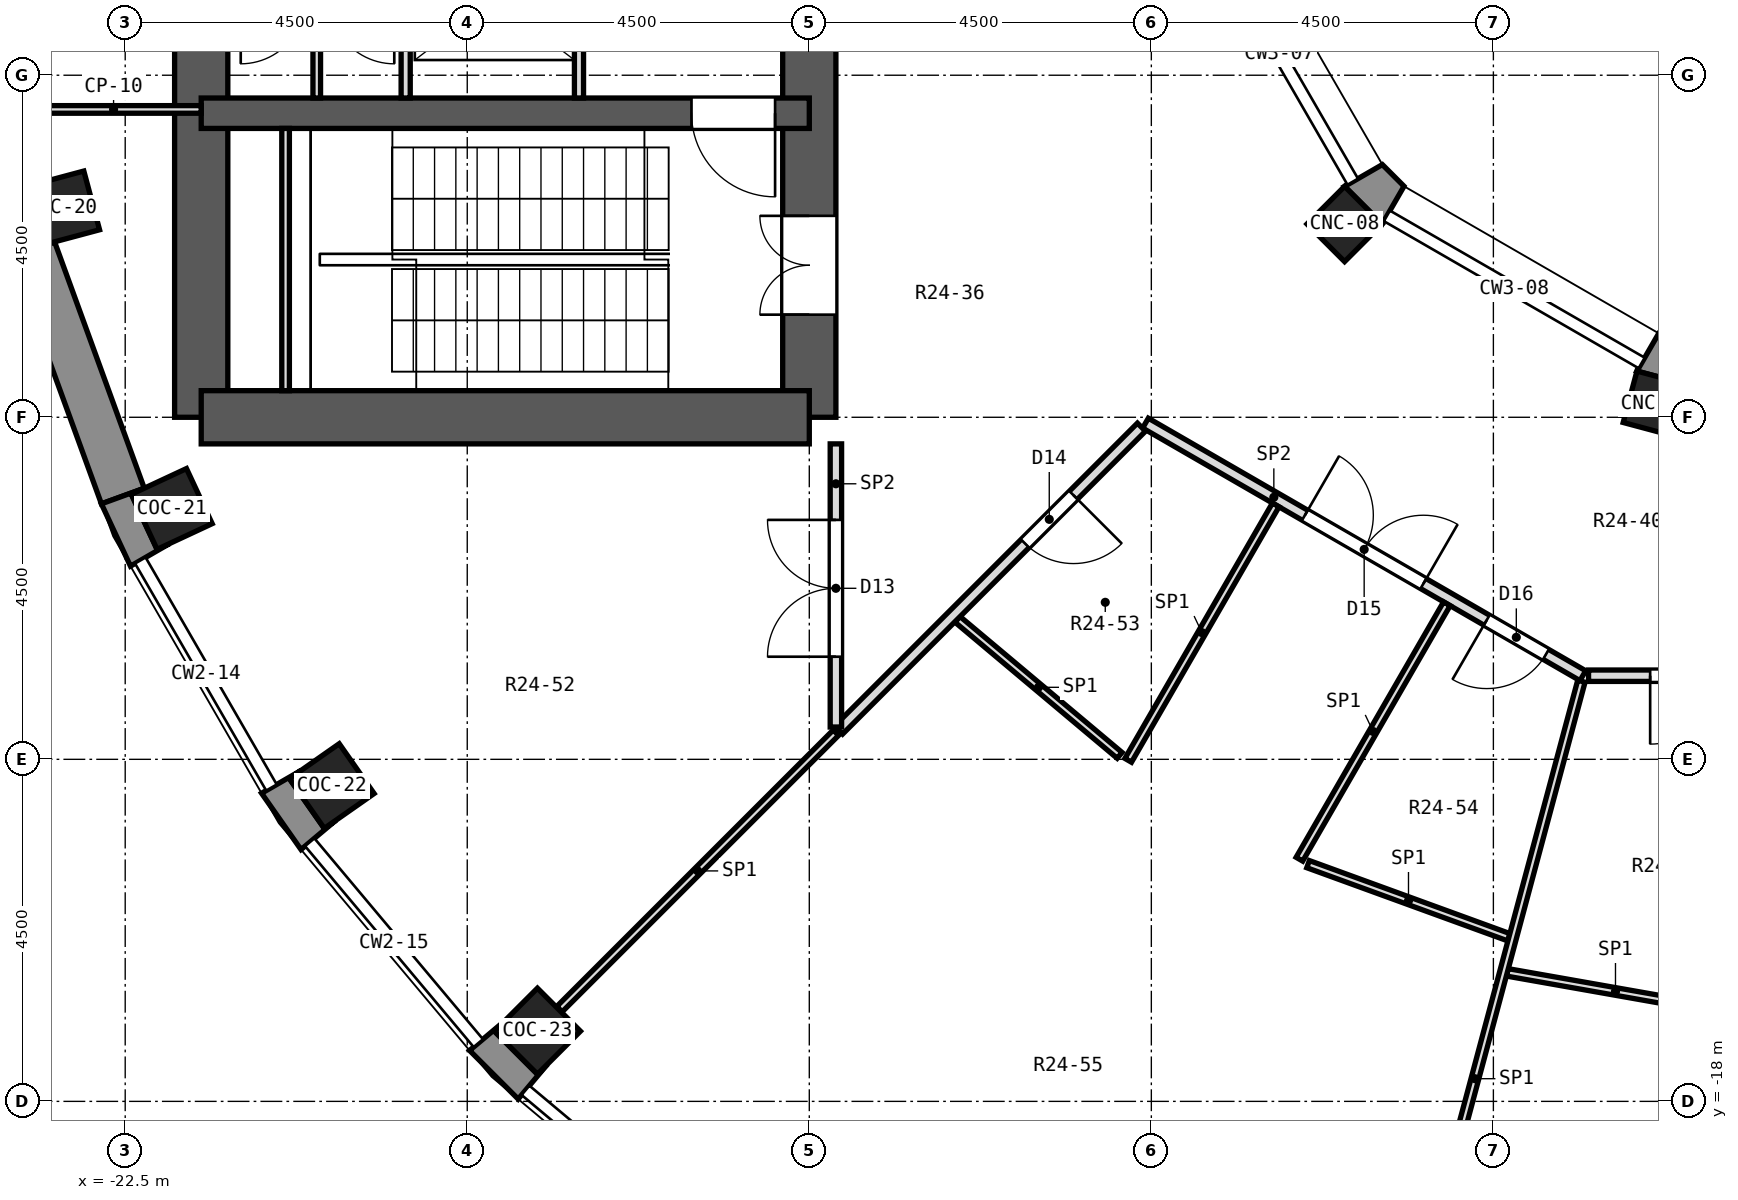
"""IFC4 building model, lengths in metres.
Left out: names, types, materials, properties, quantities, classifications, styles, units other than length and angle.
Written with IfcOpenShell. Run it as: python <this file> out.ifc"""

import sys

from ifc_helpers import new_model, si_unit, direction, frame, frame_2d, origin, origin_2d, place, context, subcontext, project, spatial, polyline, rectangle, outline, extrude, element, fill, save


model = new_model("IFC4")
c1 = context("Model", 3, precision=1e-05, world=origin(), true_north=direction((0.0, 1.0)))
c2 = subcontext(c1, "Body", "Model", "MODEL_VIEW")
j1 = project(units=[si_unit("LENGTHUNIT", "METRE"), si_unit("PLANEANGLEUNIT", "RADIAN")], contexts=[c1])
p1 = place(None, origin())
s1 = spatial("IfcSite", under=j1, at=p1, CompositionType="ELEMENT")
p2 = place(p1, origin())
s2 = spatial("IfcBuilding", under=s1, at=p2, CompositionType="ELEMENT")
p3 = place(p2, frame((0.0, 0.0, 155.8)))
s3 = spatial("IfcBuildingStorey", under=s2, at=p3, CompositionType="ELEMENT", Elevation=155.8)
for number, where, z_axis, x_axis in (
    (1, (-23.327, -6.25, -0.55), (0.0, 0.0, 1.0), (-0.966, -0.259, 0.0)),
    (2, (-21.887, -10.206, -0.55), (0.0, 0.0, 1.0), (-0.906, -0.423, 0.0)),
    (3, (-19.782, -13.852, -0.55), (0.0, 0.0, 1.0), (-0.819, -0.574, 0.0)),
    (4, (-17.077, -17.077, -0.55), (0.0, 0.0, 1.0), (-0.707, -0.707, 0.0)),
):
    element("IfcColumn", number, at=place(p3, frame(where, z_axis=z_axis, x_axis=x_axis)), inside=s3, PredefinedType="COLUMN", context=c2, shape_type="SweptSolid", body=[
        extrude(rectangle(XDim=0.8, YDim=0.8, at=origin_2d()), origin(), (0.0, 0.0, 1.0), 5.55),
    ])
for number, where, z_axis, x_axis in (
    (5, (-6.458, -6.458, 0.0), (0.0, 0.0, 1.0), (-0.707, -0.707, 0.0)),
    (6, (-2.364, -8.821, 0.0), (0.0, 0.0, 1.0), (-0.259, -0.966, 0.0)),
):
    element("IfcColumn", number, at=place(p3, frame(where, z_axis=z_axis, x_axis=x_axis)), inside=s3, PredefinedType="COLUMN", context=c2, shape_type="SweptSolid", body=[
        extrude(rectangle(XDim=0.7, YDim=0.7, at=origin_2d()), origin(), (0.0, 0.0, 1.0), 5.0),
    ])
p4 = place(p3, frame((-13.5, -9.0, 0.0), z_axis=(0.0, 0.0, 1.0), x_axis=(0.0, 1.0, 0.0)))
e7 = element("IfcWall", 7, at=p4, inside=s3, PredefinedType="SHEAR", context=c2, shape_type="SweptSolid", body=[
    extrude(rectangle(XDim=18.0, YDim=0.7, at=frame_2d((9.0, 0.0))), origin(), (0.0, 0.0, 1.0), 5.0),
])
p5 = place(p4, frame((15.35, 0.0, 0.0)))
e8 = element("IfcOpeningElement", 8, at=p5, cuts=e7, PredefinedType="OPENING", context=c2, shape_type="SweptSolid", body=[
    extrude(rectangle(XDim=1.3, YDim=2.1, at=frame_2d((0.65, 1.05))), frame((0.0, 0.362, 0.0), z_axis=(0.0, -1.0, 0.0), x_axis=(1.0, 0.0, 0.0)), (0.0, 0.0, 1.0), 0.724),
])
p6 = place(p4, frame((1.35, 0.0, 0.0)))
e9 = element("IfcOpeningElement", 9, at=p6, cuts=e7, PredefinedType="OPENING", context=c2, shape_type="SweptSolid", body=[
    extrude(rectangle(XDim=1.3, YDim=2.1, at=frame_2d((0.65, 1.05))), frame((0.0, 0.362, 0.0), z_axis=(0.0, -1.0, 0.0), x_axis=(1.0, 0.0, 0.0)), (0.0, 0.0, 1.0), 0.724),
])
p7 = place(p4, frame((7.5, 0.0, 0.0)))
e10 = element("IfcOpeningElement", 10, at=p7, cuts=e7, PredefinedType="OPENING", context=c2, shape_type="SweptSolid", body=[
    extrude(rectangle(XDim=3.0, YDim=2.4, at=frame_2d((1.5, 1.2))), frame((0.0, 0.362, 0.0), z_axis=(0.0, -1.0, 0.0), x_axis=(1.0, 0.0, 0.0)), (0.0, 0.0, 1.0), 0.724),
])
p8 = place(p3, frame((-21.5, -9.0, 0.0), z_axis=(0.0, 0.0, 1.0), x_axis=(0.0, 1.0, 0.0)))
e11 = element("IfcWall", 11, at=p8, inside=s3, PredefinedType="SHEAR", context=c2, shape_type="SweptSolid", body=[
    extrude(rectangle(XDim=18.0, YDim=0.7, at=frame_2d((9.0, 0.0))), origin(), (0.0, 0.0, 1.0), 5.0),
])
p9 = place(p8, frame((9.45, 0.0, 0.0)))
e12 = element("IfcOpeningElement", 12, at=p9, cuts=e11, PredefinedType="OPENING", context=c2, shape_type="SweptSolid", body=[
    extrude(rectangle(XDim=0.9, YDim=2.1, at=frame_2d((0.45, 1.05))), frame((0.0, 0.362, 0.0), z_axis=(0.0, -1.0, 0.0), x_axis=(1.0, 0.0, 0.0)), (0.0, 0.0, 1.0), 0.724),
])
p10 = place(p8, frame((7.65, 0.0, 0.0)))
e13 = element("IfcOpeningElement", 13, at=p10, cuts=e11, PredefinedType="OPENING", context=c2, shape_type="SweptSolid", body=[
    extrude(rectangle(XDim=0.9, YDim=2.1, at=frame_2d((0.45, 1.05))), frame((0.0, 0.362, 0.0), z_axis=(0.0, -1.0, 0.0), x_axis=(1.0, 0.0, 0.0)), (0.0, 0.0, 1.0), 0.724),
])
p11 = place(p3, frame((-13.5, -9.0, 0.0), z_axis=(0.0, 0.0, 1.0), x_axis=(-1.0, 0.0, 0.0)))
e14 = element("IfcWall", 14, at=p11, inside=s3, PredefinedType="SHEAR", context=c2, shape_type="SweptSolid", body=[
    extrude(rectangle(XDim=8.0, YDim=0.7, at=frame_2d((4.0, 0.0))), origin(), (0.0, 0.0, 1.0), 5.0),
])
p12 = place(p3, frame((-13.5, -5.0, 0.0), z_axis=(0.0, 0.0, 1.0), x_axis=(-1.0, 0.0, 0.0)))
e15 = element("IfcWall", 15, at=p12, inside=s3, PredefinedType="SHEAR", context=c2, shape_type="SweptSolid", body=[
    extrude(rectangle(XDim=8.0, YDim=0.4, at=frame_2d((4.0, 0.0))), origin(), (0.0, 0.0, 1.0), 5.0),
])
p13 = place(p12, frame((0.45, 0.0, 0.0)))
e16 = element("IfcOpeningElement", 16, at=p13, cuts=e15, PredefinedType="OPENING", context=c2, shape_type="SweptSolid", body=[
    extrude(rectangle(XDim=1.1, YDim=2.1, at=frame_2d((0.55, 1.05))), frame((0.0, 0.212, 0.0), z_axis=(0.0, -1.0, 0.0), x_axis=(1.0, 0.0, 0.0)), (0.0, 0.0, 1.0), 0.424),
])
p14 = place(p3, frame((-23.711, -6.794, 0.0), z_axis=(0.0, 0.0, 1.0), x_axis=(0.342032843455, -0.93968799822, 0.0)))
e17 = element("IfcWall", 17, at=p14, inside=s3, PredefinedType="SOLIDWALL", context=c2, shape_type="SweptSolid", body=[
    extrude(rectangle(XDim=3.45, YDim=0.6, at=frame_2d((1.725, 0.0))), origin(), (0.0, 0.0, 1.0), 4.55),
])
p15 = place(p3, origin())
e18 = element("IfcWall", 18, at=p15, inside=s3, PredefinedType="SOLIDWALL", context=c2, shape_type="SweptSolid", body=[
    extrude(outline(polyline([(-24.227, -6.023), (-23.993, -6.897), (-23.429, -6.692), (-23.61, -6.74), (-23.817, -5.968), (-23.636, -5.919), (-24.227, -6.023)])), origin(), (0.0, 0.0, 1.0), 4.55),
])
p16 = place(p3, origin())
e19 = element("IfcWall", 19, at=p16, inside=s3, PredefinedType="SOLIDWALL", context=c2, shape_type="SweptSolid", body=[
    extrude(outline(polyline([(-22.431, -10.959), (-21.911, -10.659), (-22.081, -10.738), (-22.419, -10.013), (-22.249, -9.934), (-22.813, -10.139), (-22.431, -10.959)])), origin(), (0.0, 0.0, 1.0), 4.55),
])
p17 = place(p3, origin())
e20 = element("IfcWall", 20, at=p17, inside=s3, PredefinedType="SOLIDWALL", context=c2, shape_type="SweptSolid", body=[
    extrude(outline(polyline([(-20.706, -13.946), (-20.187, -14.687), (-19.727, -14.302), (-19.881, -14.409), (-20.34, -13.754), (-20.186, -13.646), (-20.706, -13.946)])), origin(), (0.0, 0.0, 1.0), 4.55),
])
p18 = place(p3, origin())
e21 = element("IfcWall", 21, at=p18, inside=s3, PredefinedType="SOLIDWALL", context=c2, shape_type="SweptSolid", body=[
    extrude(outline(polyline([(-17.33, -17.969), (-16.944, -17.51), (-17.077, -17.642), (-17.642, -17.077), (-17.51, -16.944), (-17.969, -17.33), (-17.33, -17.969)])), origin(), (0.0, 0.0, 1.0), 4.55),
])
p19 = place(p3, origin())
e22 = element("IfcWall", 22, at=p19, inside=s3, PredefinedType="SOLIDWALL", context=c2, shape_type="SweptSolid", body=[
    extrude(outline(polyline([(-6.458, -5.962), (-5.962, -6.458), (-5.676, -5.961), (-5.961, -5.676), (-6.458, -5.962)])), origin(), (0.0, 0.0, 1.0), 4.55),
])
p20 = place(p3, origin())
e23 = element("IfcWall", 23, at=p20, inside=s3, PredefinedType="SOLIDWALL", context=c2, shape_type="SweptSolid", body=[
    extrude(outline(polyline([(-1.935, -8.573), (-1.935, -8.0), (-2.324, -7.896), (-2.611, -8.392), (-1.935, -8.573)])), origin(), (0.0, 0.0, 1.0), 4.55),
])
p21 = place(p3, frame((-11.552, -11.657, 0.0), z_axis=(0.0, 0.0, 1.0), x_axis=(0.766098290504, -0.642723431413, 0.0)))
e24 = element("IfcWall", 24, at=p21, inside=s3, PredefinedType="PARTITIONING", context=c2, shape_type="SweptSolid", body=[
    extrude(rectangle(XDim=2.786, YDim=0.1, at=frame_2d((1.393, 0.0))), origin(), (0.0, 0.0, 1.0), 4.55),
])
p22 = place(p3, frame((-9.077, -9.077, 0.0), z_axis=(0.0, 0.0, 1.0), x_axis=(0.865961614908, -0.500110469302, 0.0)))
e25 = element("IfcWall", 25, at=p22, inside=s3, PredefinedType="PARTITIONING", context=c2, shape_type="SweptSolid", body=[
    extrude(rectangle(XDim=6.645, YDim=0.15, at=frame_2d((3.322, 0.0))), origin(), (0.0, 0.0, 1.0), 4.55),
])
p23 = place(p22, frame((2.422, 0.0, 0.0)))
e26 = element("IfcOpeningElement", 26, at=p23, cuts=e25, PredefinedType="OPENING", context=c2, shape_type="SweptSolid", body=[
    extrude(rectangle(XDim=1.8, YDim=2.1, at=frame_2d((0.9, 1.05))), frame((0.0, 0.087, 0.0), z_axis=(0.0, -1.0, 0.0), x_axis=(1.0, 0.0, 0.0)), (0.0, 0.0, 1.0), 0.174),
])
p24 = place(p22, frame((5.184, 0.0, 0.0)))
e27 = element("IfcOpeningElement", 27, at=p24, cuts=e25, PredefinedType="OPENING", context=c2, shape_type="SweptSolid", body=[
    extrude(rectangle(XDim=0.9, YDim=2.1, at=frame_2d((0.45, 1.05))), frame((0.0, 0.087, 0.0), z_axis=(0.0, -1.0, 0.0), x_axis=(1.0, 0.0, 0.0)), (0.0, 0.0, 1.0), 0.174),
])
p25 = place(p3, frame((-6.938, -14.879, 0.0), z_axis=(0.0, 0.0, 1.0), x_axis=(0.939661525863, -0.342105563842, 0.0)))
e28 = element("IfcWall", 28, at=p25, inside=s3, PredefinedType="PARTITIONING", context=c2, shape_type="SweptSolid", body=[
    extrude(rectangle(XDim=2.812, YDim=0.1, at=frame_2d((1.406, 0.0))), origin(), (0.0, 0.0, 1.0), 4.55),
])
p26 = place(p3, frame((-4.317, -16.303, 0.0), z_axis=(0.0, 0.0, 1.0), x_axis=(0.984792910243, -0.173732334166, 0.0)))
e29 = element("IfcWall", 29, at=p26, inside=s3, PredefinedType="PARTITIONING", context=c2, shape_type="SweptSolid", body=[
    extrude(rectangle(XDim=2.891, YDim=0.1, at=frame_2d((1.445, 0.0))), origin(), (0.0, 0.0, 1.0), 4.55),
])
p27 = place(p3, frame((-3.248, -12.4, 0.0), z_axis=(0.0, 0.0, 1.0), x_axis=(1.0, 0.0, 0.0)))
e30 = element("IfcWall", 30, at=p27, inside=s3, PredefinedType="PARTITIONING", context=c2, shape_type="SweptSolid", body=[
    extrude(rectangle(XDim=6.521, YDim=0.15, at=frame_2d((3.26, 0.0))), origin(), (0.0, 0.0, 1.0), 4.55),
])
p28 = place(p27, frame((0.811, 0.0, 0.0)))
e31 = element("IfcOpeningElement", 31, at=p28, cuts=e30, PredefinedType="OPENING", context=c2, shape_type="SweptSolid", body=[
    extrude(rectangle(XDim=0.9, YDim=2.1, at=frame_2d((0.45, 1.05))), frame((0.0, 0.087, 0.0), z_axis=(0.0, -1.0, 0.0), x_axis=(1.0, 0.0, 0.0)), (0.0, 0.0, 1.0), 0.174),
])
p29 = place(p27, frame((3.298, 0.0, 0.0)))
e32 = element("IfcOpeningElement", 32, at=p29, cuts=e30, PredefinedType="OPENING", context=c2, shape_type="SweptSolid", body=[
    extrude(rectangle(XDim=1.2, YDim=2.1, at=frame_2d((0.6, 1.05))), frame((0.0, 0.087, 0.0), z_axis=(0.0, -1.0, 0.0), x_axis=(1.0, 0.0, 0.0)), (0.0, 0.0, 1.0), 0.174),
])
p30 = place(p27, frame((5.436, 0.0, 0.0)))
e33 = element("IfcOpeningElement", 33, at=p30, cuts=e30, PredefinedType="OPENING", context=c2, shape_type="SweptSolid", body=[
    extrude(rectangle(XDim=0.9, YDim=2.1, at=frame_2d((0.45, 1.05))), frame((0.0, 0.087, 0.0), z_axis=(0.0, -1.0, 0.0), x_axis=(1.0, 0.0, 0.0)), (0.0, 0.0, 1.0), 0.174),
])
p31 = place(p3, frame((-16.787, -16.787, 0.0), z_axis=(0.0, 0.0, 1.0), x_axis=(0.707106781187, 0.707106781187, 0.0)))
e34 = element("IfcWall", 34, at=p31, inside=s3, PredefinedType="PARTITIONING", context=c2, shape_type="SweptSolid", body=[
    extrude(rectangle(XDim=5.143, YDim=0.1, at=frame_2d((2.572, 0.0))), origin(), (0.0, 0.0, 1.0), 4.55),
])
p32 = place(p3, frame((-13.115, -13.115, 0.0), z_axis=(0.0, 0.0, 1.0), x_axis=(0.707106781187, 0.707106781187, 0.0)))
e35 = element("IfcWall", 35, at=p32, inside=s3, PredefinedType="PARTITIONING", context=c2, shape_type="SweptSolid", body=[
    extrude(rectangle(XDim=5.635, YDim=0.15, at=frame_2d((2.817, 0.0))), origin(), (0.0, 0.0, 1.0), 4.55),
])
p33 = place(p32, frame((3.47, 0.0, 0.0)))
e36 = element("IfcOpeningElement", 36, at=p33, cuts=e35, PredefinedType="OPENING", context=c2, shape_type="SweptSolid", body=[
    extrude(rectangle(XDim=0.9, YDim=2.1, at=frame_2d((0.45, 1.05))), frame((0.0, 0.087, 0.0), z_axis=(0.0, -1.0, 0.0), x_axis=(1.0, 0.0, 0.0)), (0.0, 0.0, 1.0), 0.174),
])
p34 = place(p3, frame((-7.052, -14.814, 0.0), z_axis=(0.0, 0.0, 1.0), x_axis=(0.499922173165, 0.866070332466, 0.0)))
e37 = element("IfcWall", 37, at=p34, inside=s3, PredefinedType="PARTITIONING", context=c2, shape_type="SweptSolid", body=[
    extrude(rectangle(XDim=3.88, YDim=0.1, at=frame_2d((1.94, 0.0))), origin(), (0.0, 0.0, 1.0), 4.55),
])
p35 = place(p3, frame((-9.304, -13.513, 0.0), z_axis=(0.0, 0.0, 1.0), x_axis=(0.500185351818, 0.865918364412, 0.0)))
e38 = element("IfcWall", 38, at=p35, inside=s3, PredefinedType="PARTITIONING", context=c2, shape_type="SweptSolid", body=[
    extrude(rectangle(XDim=3.88, YDim=0.1, at=frame_2d((1.94, 0.0))), origin(), (0.0, 0.0, 1.0), 4.55),
])
p36 = place(p3, frame((-6.144, -22.931, 0.0), z_axis=(0.0, 0.0, 1.0), x_axis=(0.258715046682, 0.965953686582, 0.0)))
e39 = element("IfcWall", 39, at=p36, inside=s3, PredefinedType="PARTITIONING", context=c2, shape_type="SweptSolid", body=[
    extrude(rectangle(XDim=10.828, YDim=0.1, at=frame_2d((5.414, 0.0))), origin(), (0.0, 0.0, 1.0), 4.55),
])
p37 = place(p3, frame((-13.15, -13.075, 0.0), z_axis=(0.0, 0.0, 1.0), x_axis=(0.0, 1.0, 0.0)))
e40 = element("IfcWall", 40, at=p37, inside=s3, PredefinedType="PARTITIONING", context=c2, shape_type="SweptSolid", body=[
    extrude(rectangle(XDim=3.725, YDim=0.15, at=frame_2d((1.862, 0.0))), origin(), (0.0, 0.0, 1.0), 4.55),
])
p38 = place(p37, frame((0.925, 0.0, 0.0)))
e41 = element("IfcOpeningElement", 41, at=p38, cuts=e40, PredefinedType="OPENING", context=c2, shape_type="SweptSolid", body=[
    extrude(rectangle(XDim=1.8, YDim=2.1, at=frame_2d((0.9, 1.05))), frame((0.0, 0.087, 0.0), z_axis=(0.0, -1.0, 0.0), x_axis=(1.0, 0.0, 0.0)), (0.0, 0.0, 1.0), 0.174),
])
p39 = place(p3, frame((-21.5, -4.95, 0.0), z_axis=(0.0, 0.0, 1.0), x_axis=(-1.0, 0.0, 0.0)))
e42 = element("IfcWall", 42, at=p39, inside=s3, PredefinedType="PARTITIONING", context=c2, shape_type="SweptSolid", body=[
    extrude(rectangle(XDim=2.307, YDim=0.1, at=frame_2d((1.153, 0.0))), origin(), (0.0, 0.0, 1.0), 4.55),
])
p40 = place(p3, frame((-16.53, -4.8, 0.0), z_axis=(0.0, 0.0, 1.0), x_axis=(0.0, 1.0, 0.0)))
e43 = element("IfcWall", 43, at=p40, inside=s3, PredefinedType="PARTITIONING", context=c2, shape_type="SweptSolid", body=[
    extrude(rectangle(XDim=2.6, YDim=0.12, at=frame_2d((1.3, 0.0))), origin(), (0.0, 0.0, 1.0), 4.55),
])
p41 = place(p40, frame((0.75, 0.0, 0.0)))
e44 = element("IfcOpeningElement", 44, at=p41, cuts=e43, PredefinedType="OPENING", context=c2, shape_type="SweptSolid", body=[
    extrude(rectangle(XDim=1.1, YDim=2.1, at=frame_2d((0.55, 1.05))), frame((0.0, 0.072, 0.0), z_axis=(0.0, -1.0, 0.0), x_axis=(1.0, 0.0, 0.0)), (0.0, 0.0, 1.0), 0.144),
])
p42 = place(p3, frame((-18.81, -4.8, 0.0), z_axis=(0.0, 0.0, 1.0), x_axis=(0.0, 1.0, 0.0)))
e45 = element("IfcWall", 45, at=p42, inside=s3, PredefinedType="PARTITIONING", context=c2, shape_type="SweptSolid", body=[
    extrude(rectangle(XDim=2.6, YDim=0.12, at=frame_2d((1.3, 0.0))), origin(), (0.0, 0.0, 1.0), 4.55),
])
p43 = place(p3, frame((-19.98, -4.8, 0.0), z_axis=(0.0, 0.0, 1.0), x_axis=(0.0, 1.0, 0.0)))
e46 = element("IfcWall", 46, at=p43, inside=s3, PredefinedType="PARTITIONING", context=c2, shape_type="SweptSolid", body=[
    extrude(rectangle(XDim=2.6, YDim=0.1, at=frame_2d((1.3, 0.0))), origin(), (0.0, 0.0, 1.0), 4.55),
])
p44 = place(p3, frame((-20.39, -8.65, 0.0), z_axis=(0.0, 0.0, 1.0), x_axis=(0.0, 1.0, 0.0)))
e47 = element("IfcWall", 47, at=p44, inside=s3, PredefinedType="PARTITIONING", context=c2, shape_type="SweptSolid", body=[
    extrude(rectangle(XDim=3.45, YDim=0.1, at=frame_2d((1.725, 0.0))), origin(), (0.0, 0.0, 1.0), 4.55),
])
p45 = place(p38, origin())
e48 = element("IfcDoor", 48, at=p45, inside=s3, OperationType="DOUBLE_DOOR_SINGLE_SWING", PredefinedType="DOOR", context=c2, shape_type="SweptSolid", body=[
    extrude(rectangle(XDim=1.8, YDim=2.1, at=frame_2d((0.9, 1.05))), frame((0.0, 0.025, 0.0), z_axis=(0.0, -1.0, 0.0), x_axis=(1.0, 0.0, 0.0)), (0.0, 0.0, 1.0), 0.05),
])
fill(e41, e48)
p46 = place(p33, frame((0.9, 0.0, 0.0), z_axis=(0.0, 0.0, 1.0), x_axis=(-1.0, 0.0, 0.0)))
e49 = element("IfcDoor", 49, at=p46, inside=s3, OperationType="SINGLE_SWING_LEFT", PredefinedType="DOOR", context=c2, shape_type="SweptSolid", body=[
    extrude(rectangle(XDim=0.9, YDim=2.1, at=frame_2d((0.45, 1.05))), frame((0.0, 0.025, 0.0), z_axis=(0.0, -1.0, 0.0), x_axis=(1.0, 0.0, 0.0)), (0.0, 0.0, 1.0), 0.05),
])
fill(e36, e49)
p47 = place(p23, origin())
e50 = element("IfcDoor", 50, at=p47, inside=s3, OperationType="DOUBLE_DOOR_SINGLE_SWING", PredefinedType="DOOR", context=c2, shape_type="SweptSolid", body=[
    extrude(rectangle(XDim=1.8, YDim=2.1, at=frame_2d((0.9, 1.05))), frame((0.0, 0.025, 0.0), z_axis=(0.0, -1.0, 0.0), x_axis=(1.0, 0.0, 0.0)), (0.0, 0.0, 1.0), 0.05),
])
fill(e26, e50)
p48 = place(p24, frame((0.9, 0.0, 0.0), z_axis=(0.0, 0.0, 1.0), x_axis=(-1.0, 0.0, 0.0)))
e51 = element("IfcDoor", 51, at=p48, inside=s3, OperationType="SINGLE_SWING_RIGHT", PredefinedType="DOOR", context=c2, shape_type="SweptSolid", body=[
    extrude(rectangle(XDim=0.9, YDim=2.1, at=frame_2d((0.45, 1.05))), frame((0.0, 0.025, 0.0), z_axis=(0.0, -1.0, 0.0), x_axis=(1.0, 0.0, 0.0)), (0.0, 0.0, 1.0), 0.05),
])
fill(e27, e51)
p49 = place(p28, frame((0.9, 0.0, 0.0), z_axis=(0.0, 0.0, 1.0), x_axis=(-1.0, 0.0, 0.0)))
e52 = element("IfcDoor", 52, at=p49, inside=s3, OperationType="SINGLE_SWING_RIGHT", PredefinedType="DOOR", context=c2, shape_type="SweptSolid", body=[
    extrude(rectangle(XDim=0.9, YDim=2.1, at=frame_2d((0.45, 1.05))), frame((0.0, 0.025, 0.0), z_axis=(0.0, -1.0, 0.0), x_axis=(1.0, 0.0, 0.0)), (0.0, 0.0, 1.0), 0.05),
])
fill(e31, e52)
p50 = place(p13, origin())
e53 = element("IfcDoor", 53, at=p50, inside=s3, OperationType="SINGLE_SWING_LEFT", PredefinedType="DOOR", context=c2, shape_type="SweptSolid", body=[
    extrude(rectangle(XDim=1.1, YDim=2.1, at=frame_2d((0.55, 1.05))), frame((0.0, 0.025, 0.0), z_axis=(0.0, -1.0, 0.0), x_axis=(1.0, 0.0, 0.0)), (0.0, 0.0, 1.0), 0.05),
])
fill(e16, e53)
p51 = place(p6, origin())
e54 = element("IfcDoor", 54, at=p51, inside=s3, OperationType="DOUBLE_DOOR_SINGLE_SWING", PredefinedType="DOOR", context=c2, shape_type="SweptSolid", body=[
    extrude(rectangle(XDim=1.3, YDim=2.1, at=frame_2d((0.65, 1.05))), frame((0.0, 0.025, 0.0), z_axis=(0.0, -1.0, 0.0), x_axis=(1.0, 0.0, 0.0)), (0.0, 0.0, 1.0), 0.05),
])
fill(e9, e54)
save(model, sys.argv[1])
